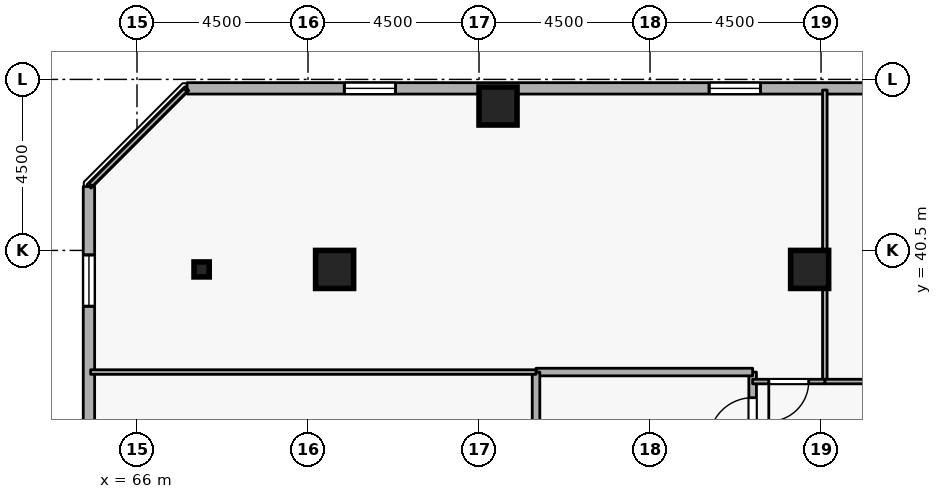
"""IFC4 building model, lengths in metres.
Left out: names, types, materials, properties, quantities, classifications, styles, units other than length and angle.
Written with IfcOpenShell. Run it as: python <this file> out.ifc"""

import sys

from ifc_helpers import new_model, si_unit, direction, frame, frame_2d, origin, origin_2d, place, context, subcontext, project, spatial, rectangle, i_section, extrude, element, fill, save


model = new_model("IFC4")
c1 = context("Model", 3, precision=1e-05, world=origin(), true_north=direction((0.0, 1.0)))
c2 = subcontext(c1, "Body", "Model", "MODEL_VIEW")
j1 = project(units=[si_unit("LENGTHUNIT", "METRE"), si_unit("PLANEANGLEUNIT", "RADIAN")], contexts=[c1])
p1 = place(None, origin())
s1 = spatial("IfcSite", under=j1, at=p1, CompositionType="ELEMENT")
p2 = place(p1, origin())
s2 = spatial("IfcBuilding", under=s1, at=p2, CompositionType="ELEMENT")
p3 = place(p2, frame((0.0, 0.0, 218.1)))
s3 = spatial("IfcBuildingStorey", under=s2, at=p3, CompositionType="ELEMENT", Elevation=218.1)
for number, where, z_axis, x_axis in (
    (1, (75.5, 44.3, 0.0), (0.0, 0.0, 1.0), (1.0, 0.0, 0.0)),
    (2, (71.2, 40.0, 0.0), (0.0, 0.0, 1.0), (1.0, 0.0, 0.0)),
    (3, (83.7, 40.0, 0.0), (0.0, 0.0, 1.0), (1.0, 0.0, 0.0)),
):
    element("IfcColumn", number, at=place(p3, frame(where, z_axis=z_axis, x_axis=x_axis)), inside=s3, PredefinedType="COLUMN", context=c2, shape_type="SweptSolid", body=[
        extrude(rectangle(XDim=1.0, YDim=1.0, at=origin_2d()), origin(), (0.0, 0.0, 1.0), 3.6),
    ])
p4 = place(p3, frame((67.7, 40.0, 0.0), z_axis=(0.0, 0.0, 1.0), x_axis=(1.0, 0.0, 0.0)))
e4 = element("IfcColumn", 4, at=p4, inside=s3, PredefinedType="COLUMN", context=c2, shape_type="SweptSolid", body=[
    extrude(i_section(OverallWidth=0.399, OverallDepth=0.394, WebThickness=0.023, FlangeThickness=0.037, FilletRadius=0.015, at=origin_2d()), origin(), (0.0, 0.0, 1.0), 3.6),
])
p5 = place(p3, frame((103.406, 44.764, 0.0), z_axis=(0.0, 0.0, 1.0), x_axis=(-0.999999999634, 2.7061402e-05, 0.0)))
e5 = element("IfcWall", 5, at=p5, inside=s3, PredefinedType="STANDARD", context=c2, shape_type="SweptSolid", body=[
    extrude(rectangle(XDim=36.087, YDim=0.3, at=frame_2d((18.043, 0.0))), origin(), (0.0, 0.0, 1.0), 2.66),
])
p6 = place(p5, frame((6.6, 0.0, 0.72)))
e6 = element("IfcOpeningElement", 6, at=p6, cuts=e5, PredefinedType="OPENING", context=c2, shape_type="SweptSolid", body=[
    extrude(rectangle(XDim=1.35, YDim=1.05, at=frame_2d((0.675, 0.525))), frame((0.0, 0.16, 0.0), z_axis=(0.0, -1.0, 0.0), x_axis=(1.0, 0.0, 0.0)), (0.0, 0.0, 1.0), 0.32),
])
p7 = place(p5, frame((11.4, 0.0, 0.72)))
e7 = element("IfcOpeningElement", 7, at=p7, cuts=e5, PredefinedType="OPENING", context=c2, shape_type="SweptSolid", body=[
    extrude(rectangle(XDim=1.35, YDim=1.05, at=frame_2d((0.675, 0.525))), frame((0.0, 0.16, 0.0), z_axis=(0.0, -1.0, 0.0), x_axis=(1.0, 0.0, 0.0)), (0.0, 0.0, 1.0), 0.32),
])
p8 = place(p5, frame((16.2, 0.0, 0.72)))
e8 = element("IfcOpeningElement", 8, at=p8, cuts=e5, PredefinedType="OPENING", context=c2, shape_type="SweptSolid", body=[
    extrude(rectangle(XDim=1.35, YDim=1.05, at=frame_2d((0.675, 0.525))), frame((0.0, 0.16, 0.0), z_axis=(0.0, -1.0, 0.0), x_axis=(1.0, 0.0, 0.0)), (0.0, 0.0, 1.0), 0.32),
])
p9 = place(p5, frame((21.0, 0.0, 0.72)))
e9 = element("IfcOpeningElement", 9, at=p9, cuts=e5, PredefinedType="OPENING", context=c2, shape_type="SweptSolid", body=[
    extrude(rectangle(XDim=1.35, YDim=1.05, at=frame_2d((0.675, 0.525))), frame((0.0, 0.16, 0.0), z_axis=(0.0, -1.0, 0.0), x_axis=(1.0, 0.0, 0.0)), (0.0, 0.0, 1.0), 0.32),
])
p10 = place(p5, frame((30.6, 0.0, 0.72)))
e10 = element("IfcOpeningElement", 10, at=p10, cuts=e5, PredefinedType="OPENING", context=c2, shape_type="SweptSolid", body=[
    extrude(rectangle(XDim=1.35, YDim=1.05, at=frame_2d((0.675, 0.525))), frame((0.0, 0.16, 0.0), z_axis=(0.0, -1.0, 0.0), x_axis=(1.0, 0.0, 0.0)), (0.0, 0.0, 1.0), 0.32),
])
p11 = place(p3, frame((64.735, 42.181, 0.0), z_axis=(0.0, 0.0, 1.0), x_axis=(2.7061402e-05, -0.999999999634, 0.0)))
e11 = element("IfcWall", 11, at=p11, inside=s3, PredefinedType="STANDARD", context=c2, shape_type="SweptSolid", body=[
    extrude(rectangle(XDim=36.087, YDim=0.3, at=frame_2d((18.043, 0.0))), origin(), (0.0, 0.0, 1.0), 2.66),
])
p12 = place(p11, frame((1.8, 0.0, 0.72)))
e12 = element("IfcOpeningElement", 12, at=p12, cuts=e11, PredefinedType="OPENING", context=c2, shape_type="SweptSolid", body=[
    extrude(rectangle(XDim=1.35, YDim=1.05, at=frame_2d((0.675, 0.525))), frame((0.0, 0.16, 0.0), z_axis=(0.0, -1.0, 0.0), x_axis=(1.0, 0.0, 0.0)), (0.0, 0.0, 1.0), 0.32),
])
p13 = place(p11, frame((6.6, 0.0, 0.72)))
e13 = element("IfcOpeningElement", 13, at=p13, cuts=e11, PredefinedType="OPENING", context=c2, shape_type="SweptSolid", body=[
    extrude(rectangle(XDim=1.35, YDim=1.05, at=frame_2d((0.675, 0.525))), frame((0.0, 0.16, 0.0), z_axis=(0.0, -1.0, 0.0), x_axis=(1.0, 0.0, 0.0)), (0.0, 0.0, 1.0), 0.32),
])
p14 = place(p11, frame((21.0, 0.0, 0.72)))
e14 = element("IfcOpeningElement", 14, at=p14, cuts=e11, PredefinedType="OPENING", context=c2, shape_type="SweptSolid", body=[
    extrude(rectangle(XDim=1.35, YDim=1.05, at=frame_2d((0.675, 0.525))), frame((0.0, 0.16, 0.0), z_axis=(0.0, -1.0, 0.0), x_axis=(1.0, 0.0, 0.0)), (0.0, 0.0, 1.0), 0.32),
])
p15 = place(p11, frame((30.6, 0.0, 0.72)))
e15 = element("IfcOpeningElement", 15, at=p15, cuts=e11, PredefinedType="OPENING", context=c2, shape_type="SweptSolid", body=[
    extrude(rectangle(XDim=1.35, YDim=1.05, at=frame_2d((0.675, 0.525))), frame((0.0, 0.16, 0.0), z_axis=(0.0, -1.0, 0.0), x_axis=(1.0, 0.0, 0.0)), (0.0, 0.0, 1.0), 0.32),
])
p16 = place(p3, frame((82.2, 34.8, 0.0), z_axis=(0.0, 0.0, 1.0), x_axis=(0.0, 1.0, 0.0)))
e16 = element("IfcWall", 16, at=p16, inside=s3, PredefinedType="STANDARD", context=c2, shape_type="SweptSolid", body=[
    extrude(rectangle(XDim=2.5, YDim=0.2, at=frame_2d((1.25, 0.0))), origin(), (0.0, 0.0, 1.0), 3.26),
])
p17 = place(p16, frame((0.675, 0.0, 0.0)))
e17 = element("IfcOpeningElement", 17, at=p17, cuts=e16, PredefinedType="OPENING", context=c2, shape_type="SweptSolid", body=[
    extrude(rectangle(XDim=1.15, YDim=2.1, at=frame_2d((0.575, 1.05))), frame((0.0, 0.11, 0.0), z_axis=(0.0, -1.0, 0.0), x_axis=(1.0, 0.0, 0.0)), (0.0, 0.0, 1.0), 0.22),
])
p18 = place(p3, frame((82.2, 37.3, 0.0), z_axis=(0.0, 0.0, 1.0), x_axis=(-1.0, 0.0, 0.0)))
e18 = element("IfcWall", 18, at=p18, inside=s3, PredefinedType="STANDARD", context=c2, shape_type="SweptSolid", body=[
    extrude(rectangle(XDim=5.7, YDim=0.2, at=frame_2d((2.85, 0.0))), origin(), (0.0, 0.0, 1.0), 3.26),
])
p19 = place(p3, frame((76.5, 37.3, 0.0), z_axis=(0.0, 0.0, 1.0), x_axis=(0.0, -1.0, 0.0)))
e19 = element("IfcWall", 19, at=p19, inside=s3, PredefinedType="STANDARD", context=c2, shape_type="SweptSolid", body=[
    extrude(rectangle(XDim=2.5, YDim=0.2, at=frame_2d((1.25, 0.0))), origin(), (0.0, 0.0, 1.0), 3.26),
])
p20 = place(p3, frame((84.1, 37.05, 0.0), z_axis=(0.0, 0.0, 1.0), x_axis=(0.0, 1.0, 0.0)))
e20 = element("IfcWall", 20, at=p20, inside=s3, PredefinedType="PARTITIONING", context=c2, shape_type="SweptSolid", body=[
    extrude(rectangle(XDim=7.67, YDim=0.12, at=frame_2d((3.835, 0.0))), origin(), (0.0, 0.0, 1.0), 3.26),
])
p21 = place(p3, frame((88.9, 37.05, 0.0), z_axis=(0.0, 0.0, 1.0), x_axis=(-1.0, 0.0, 0.0)))
e21 = element("IfcWall", 21, at=p21, inside=s3, PredefinedType="PARTITIONING", context=c2, shape_type="SweptSolid", body=[
    extrude(rectangle(XDim=4.8, YDim=0.12, at=frame_2d((2.4, 0.0))), origin(), (0.0, 0.0, 1.0), 3.26),
])
p22 = place(p21, frame((1.925, 0.0, 0.0)))
e22 = element("IfcOpeningElement", 22, at=p22, cuts=e21, PredefinedType="OPENING", context=c2, shape_type="SweptSolid", body=[
    extrude(rectangle(XDim=0.95, YDim=2.1, at=frame_2d((0.475, 1.05))), frame((0.0, 0.07, 0.0), z_axis=(0.0, -1.0, 0.0), x_axis=(1.0, 0.0, 0.0)), (0.0, 0.0, 1.0), 0.14),
])
p23 = place(p3, frame((76.5, 37.3, 0.0), z_axis=(0.0, 0.0, 1.0), x_axis=(-1.0, 0.0, 0.0)))
e23 = element("IfcWall", 23, at=p23, inside=s3, PredefinedType="PARTITIONING", context=c2, shape_type="SweptSolid", body=[
    extrude(rectangle(XDim=11.72, YDim=0.12, at=frame_2d((5.86, 0.0))), origin(), (0.0, 0.0, 1.0), 3.26),
])
p24 = place(p3, frame((64.78, 42.225, 0.0), z_axis=(0.0, 0.0, 1.0), x_axis=(0.707106781187, 0.707106781187, 0.0)))
e24 = element("IfcWall", 24, at=p24, inside=s3, PredefinedType="PARTITIONING", context=c2, shape_type="SweptSolid", body=[
    extrude(rectangle(XDim=3.528, YDim=0.12, at=frame_2d((1.764, 0.0))), origin(), (0.0, 0.0, 1.0), 3.26),
])
p25 = place(p3, frame((84.1, 37.05, 0.0), z_axis=(0.0, 0.0, 1.0), x_axis=(-1.0, 0.0, 0.0)))
e25 = element("IfcWall", 25, at=p25, inside=s3, PredefinedType="PARTITIONING", context=c2, shape_type="SweptSolid", body=[
    extrude(rectangle(XDim=1.9, YDim=0.12, at=frame_2d((0.95, 0.0))), origin(), (0.0, 0.0, 1.0), 3.26),
])
p26 = place(p25, frame((0.425, 0.0, 0.0)))
e26 = element("IfcOpeningElement", 26, at=p26, cuts=e25, PredefinedType="OPENING", context=c2, shape_type="SweptSolid", body=[
    extrude(rectangle(XDim=1.05, YDim=2.1, at=frame_2d((0.525, 1.05))), frame((0.0, 0.07, 0.0), z_axis=(0.0, -1.0, 0.0), x_axis=(1.0, 0.0, 0.0)), (0.0, 0.0, 1.0), 0.14),
])
p27 = place(p9, origin())
e27 = element("IfcWindow", 27, at=p27, inside=s3, PartitioningType="SINGLE_PANEL", PredefinedType="WINDOW", context=c2, shape_type="SweptSolid", body=[
    extrude(rectangle(XDim=1.35, YDim=1.05, at=frame_2d((0.675, 0.525))), frame((0.0, 0.03, 0.0), z_axis=(0.0, -1.0, 0.0), x_axis=(1.0, 0.0, 0.0)), (0.0, 0.0, 1.0), 0.06),
])
fill(e9, e27)
p28 = place(p10, origin())
e28 = element("IfcWindow", 28, at=p28, inside=s3, PartitioningType="SINGLE_PANEL", PredefinedType="WINDOW", context=c2, shape_type="SweptSolid", body=[
    extrude(rectangle(XDim=1.35, YDim=1.05, at=frame_2d((0.675, 0.525))), frame((0.0, 0.03, 0.0), z_axis=(0.0, -1.0, 0.0), x_axis=(1.0, 0.0, 0.0)), (0.0, 0.0, 1.0), 0.06),
])
fill(e10, e28)
p29 = place(p12, origin())
e29 = element("IfcWindow", 29, at=p29, inside=s3, PartitioningType="SINGLE_PANEL", PredefinedType="WINDOW", context=c2, shape_type="SweptSolid", body=[
    extrude(rectangle(XDim=1.35, YDim=1.05, at=frame_2d((0.675, 0.525))), frame((0.0, 0.03, 0.0), z_axis=(0.0, -1.0, 0.0), x_axis=(1.0, 0.0, 0.0)), (0.0, 0.0, 1.0), 0.06),
])
fill(e12, e29)
p30 = place(p17, origin())
e30 = element("IfcDoor", 30, at=p30, inside=s3, OperationType="SINGLE_SWING_LEFT", PredefinedType="DOOR", context=c2, shape_type="SweptSolid", body=[
    extrude(rectangle(XDim=1.15, YDim=2.1, at=frame_2d((0.575, 1.05))), frame((0.0, 0.025, 0.0), z_axis=(0.0, -1.0, 0.0), x_axis=(1.0, 0.0, 0.0)), (0.0, 0.0, 1.0), 0.05),
])
fill(e17, e30)
p31 = place(p26, origin())
e31 = element("IfcDoor", 31, at=p31, inside=s3, OperationType="SINGLE_SWING_RIGHT", PredefinedType="DOOR", context=c2, shape_type="SweptSolid", body=[
    extrude(rectangle(XDim=1.05, YDim=2.1, at=frame_2d((0.525, 1.05))), frame((0.0, 0.025, 0.0), z_axis=(0.0, -1.0, 0.0), x_axis=(1.0, 0.0, 0.0)), (0.0, 0.0, 1.0), 0.05),
])
fill(e26, e31)
save(model, sys.argv[1])
